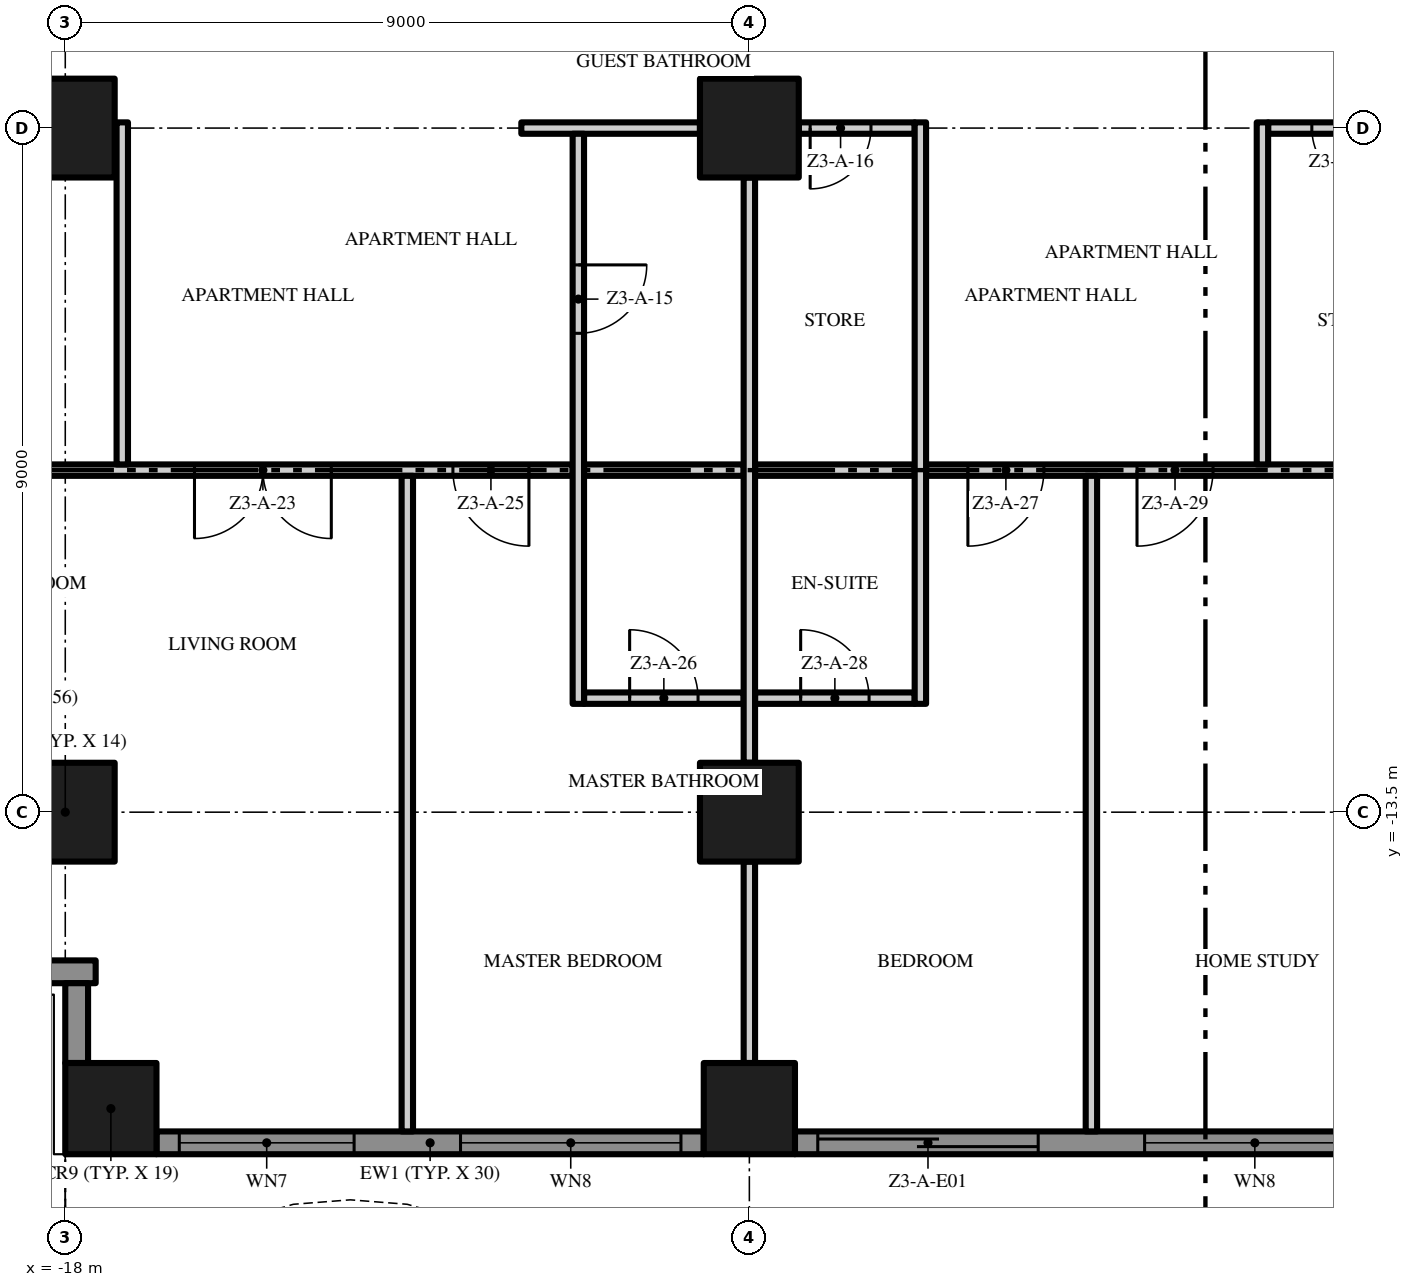
"""IFC4 building model, lengths in metres.
Left out: names, types, materials, properties, quantities, classifications, styles, units other than length and angle.
Written with IfcOpenShell. Run it as: python <this file> out.ifc"""

import sys

from ifc_helpers import new_model, si_unit, direction, frame, frame_2d, origin, origin_2d, place, context, subcontext, project, spatial, polyline, rectangle, outline, extrude, element, fill, save


model = new_model("IFC4")
c1 = context("Model", 3, precision=1e-05, world=origin(), true_north=direction((0.0, 1.0)))
c2 = subcontext(c1, "Body", "Model", "MODEL_VIEW")
j1 = project(units=[si_unit("LENGTHUNIT", "METRE"), si_unit("PLANEANGLEUNIT", "RADIAN")], contexts=[c1])
p1 = place(None, origin())
s1 = spatial("IfcSite", under=j1, at=p1, CompositionType="ELEMENT")
p2 = place(p1, origin())
s2 = spatial("IfcBuilding", under=s1, at=p2, CompositionType="ELEMENT")
p3 = place(p2, frame((0.0, 0.0, 128.8)))
s3 = spatial("IfcBuildingStorey", under=s2, at=p3, CompositionType="ELEMENT", Elevation=128.8)
p4 = place(p3, frame((-18.0, -13.5, 0.0), z_axis=(0.0, 0.0, 1.0), x_axis=(1.0, 0.0, 0.0)))
e1 = element("IfcColumn", 1, at=p4, inside=s3, PredefinedType="COLUMN", context=c2, shape_type="SweptSolid", body=[
    extrude(rectangle(XDim=1.3, YDim=1.3, at=origin_2d()), origin(), (0.0, 0.0, 1.0), 3.5),
])
p5 = place(p3, frame((-17.4, -17.4, 0.0), z_axis=(0.0, 0.0, 1.0), x_axis=(1.0, 0.0, 0.0)))
e2 = element("IfcColumn", 2, at=p5, inside=s3, PredefinedType="COLUMN", context=c2, shape_type="SweptSolid", body=[
    extrude(rectangle(XDim=1.2, YDim=1.2, at=origin_2d()), origin(), (0.0, 0.0, 1.0), 3.5),
])
for number, where, z_axis, x_axis in (
    (3, (-18.0, -4.5, 0.0), (0.0, 0.0, 1.0), (1.0, 0.0, 0.0)),
    (4, (-9.0, -13.5, 0.0), (0.0, 0.0, 1.0), (1.0, 0.0, 0.0)),
):
    element("IfcColumn", number, at=place(p3, frame(where, z_axis=z_axis, x_axis=x_axis)), inside=s3, PredefinedType="COLUMN", context=c2, shape_type="SweptSolid", body=[
        extrude(rectangle(XDim=1.3, YDim=1.3, at=origin_2d()), origin(), (0.0, 0.0, 1.0), 3.5),
    ])
p6 = place(p3, frame((-9.0, -17.4, 0.0), z_axis=(0.0, 0.0, 1.0), x_axis=(1.0, 0.0, 0.0)))
e5 = element("IfcColumn", 5, at=p6, inside=s3, PredefinedType="COLUMN", context=c2, shape_type="SweptSolid", body=[
    extrude(rectangle(XDim=1.2, YDim=1.2, at=origin_2d()), origin(), (0.0, 0.0, 1.0), 3.5),
])
p7 = place(p3, frame((-9.0, -4.5, 0.0), z_axis=(0.0, 0.0, 1.0), x_axis=(1.0, 0.0, 0.0)))
e6 = element("IfcColumn", 6, at=p7, inside=s3, PredefinedType="COLUMN", context=c2, shape_type="SweptSolid", body=[
    extrude(rectangle(XDim=1.3, YDim=1.3, at=origin_2d()), origin(), (0.0, 0.0, 1.0), 3.5),
])
p8 = place(p3, frame((-9.6, -17.85, 0.0), z_axis=(0.0, 0.0, 1.0), x_axis=(-1.0, 0.0, 0.0)))
e7 = element("IfcWall", 7, at=p8, inside=s3, PredefinedType="SOLIDWALL", context=c2, shape_type="SweptSolid", body=[
    extrude(rectangle(XDim=7.2, YDim=0.3, at=frame_2d((3.6, 0.0))), origin(), (0.0, 0.0, 1.0), 3.5),
])
p9 = place(p8, frame((4.6, 0.0, 0.45)))
e8 = element("IfcOpeningElement", 8, at=p9, cuts=e7, PredefinedType="OPENING", context=c2, shape_type="SweptSolid", body=[
    extrude(rectangle(XDim=2.3, YDim=2.65, at=frame_2d((1.15, 1.325))), frame((0.0, 0.16, 0.0), z_axis=(0.0, -1.0, 0.0), x_axis=(1.0, 0.0, 0.0)), (0.0, 0.0, 1.0), 0.32),
])
p10 = place(p8, frame((0.3, 0.0, 0.45)))
e9 = element("IfcOpeningElement", 9, at=p10, cuts=e7, PredefinedType="OPENING", context=c2, shape_type="SweptSolid", body=[
    extrude(rectangle(XDim=2.9, YDim=2.65, at=frame_2d((1.45, 1.325))), frame((0.0, 0.16, 0.0), z_axis=(0.0, -1.0, 0.0), x_axis=(1.0, 0.0, 0.0)), (0.0, 0.0, 1.0), 0.32),
])
p11 = place(p3, frame((-0.6, -17.85, 0.0), z_axis=(0.0, 0.0, 1.0), x_axis=(-1.0, 0.0, 0.0)))
e10 = element("IfcWall", 10, at=p11, inside=s3, PredefinedType="SOLIDWALL", context=c2, shape_type="SweptSolid", body=[
    extrude(rectangle(XDim=7.8, YDim=0.3, at=frame_2d((3.9, 0.0))), origin(), (0.0, 0.0, 1.0), 3.5),
])
p12 = place(p11, frame((4.6, 0.0, 0.0)))
e11 = element("IfcOpeningElement", 11, at=p12, cuts=e10, PredefinedType="OPENING", context=c2, shape_type="SweptSolid", body=[
    extrude(rectangle(XDim=2.9, YDim=2.4, at=frame_2d((1.45, 1.2))), frame((0.0, 0.16, 0.0), z_axis=(0.0, -1.0, 0.0), x_axis=(1.0, 0.0, 0.0)), (0.0, 0.0, 1.0), 0.32),
])
p13 = place(p11, frame((0.3, 0.0, 0.45)))
e12 = element("IfcOpeningElement", 12, at=p13, cuts=e10, PredefinedType="OPENING", context=c2, shape_type="SweptSolid", body=[
    extrude(rectangle(XDim=2.9, YDim=2.65, at=frame_2d((1.45, 1.325))), frame((0.0, 0.16, 0.0), z_axis=(0.0, -1.0, 0.0), x_axis=(1.0, 0.0, 0.0)), (0.0, 0.0, 1.0), 0.32),
])
p14 = place(p3, frame((-17.6, -15.6, 0.0), z_axis=(0.0, 0.0, 1.0), x_axis=(-1.0, 0.0, 0.0)))
e13 = element("IfcWall", 13, at=p14, inside=s3, PredefinedType="SOLIDWALL", context=c2, shape_type="SweptSolid", body=[
    extrude(rectangle(XDim=2.35, YDim=0.3, at=frame_2d((1.175, 0.0))), origin(), (0.0, 0.0, 1.0), 3.5),
])
p15 = place(p3, frame((-17.85, -16.8, 0.0), z_axis=(0.0, 0.0, 1.0), x_axis=(0.0, 1.0, 0.0)))
e14 = element("IfcWall", 14, at=p15, inside=s3, PredefinedType="SOLIDWALL", context=c2, shape_type="SweptSolid", body=[
    extrude(rectangle(XDim=1.05, YDim=0.3, at=frame_2d((0.525, 0.0))), origin(), (0.0, 0.0, 1.0), 3.5),
])
p16 = place(p3, origin())
e15 = element("IfcWall", 15, at=p16, inside=s3, PredefinedType="USERDEFINED", context=c2, shape_type="SweptSolid", body=[
    extrude(outline(polyline([(-18.0, -19.8), (-16.5, -19.095), (-15.0, -18.659), (-14.25, -18.6), (-13.5, -18.659), (-12.0, -19.095), (-10.5, -19.8), (-9.0, -20.505), (-7.5, -20.941), (-6.75, -21.0), (-6.0, -20.941), (-4.5, -20.505), (-3.0, -19.8), (-1.5, -19.095), (0.0, -18.659), (0.75, -18.6), (1.5, -18.659), (3.0, -19.095), (4.5, -19.8), (6.0, -20.505), (7.5, -20.941), (8.25, -21.0), (9.0, -20.941), (10.5, -20.505), (12.0, -19.8), (13.5, -19.095), (15.0, -18.659), (15.75, -18.6), (16.5, -18.659), (18.0, -19.095), (18.07, -18.855), (16.545, -18.411), (15.75, -18.349), (14.955, -18.411), (13.411, -18.86), (11.894, -19.574), (10.411, -20.271), (8.955, -20.694), (8.25, -20.749), (7.545, -20.694), (6.089, -20.271), (4.606, -19.574), (3.089, -18.86), (1.545, -18.411), (0.75, -18.349), (-0.045, -18.411), (-1.589, -18.86), (-3.106, -19.574), (-4.589, -20.271), (-6.045, -20.694), (-6.75, -20.749), (-7.455, -20.694), (-8.911, -20.271), (-10.394, -19.574), (-11.911, -18.86), (-13.455, -18.411), (-14.25, -18.349), (-15.045, -18.411), (-16.589, -18.86), (-18.106, -19.574), (-18.0, -19.8)])), origin(), (0.0, 0.0, 1.0), 0.9),
])
p17 = place(p3, frame((-11.175, -12.0, 0.0), z_axis=(0.0, 0.0, 1.0), x_axis=(1.0, 0.0, 0.0)))
e16 = element("IfcWall", 16, at=p17, inside=s3, PredefinedType="PARTITIONING", context=c2, shape_type="SweptSolid", body=[
    extrude(rectangle(XDim=2.1, YDim=0.15, at=frame_2d((1.05, 0.0))), origin(), (0.0, 0.0, 1.0), 3.5),
])
p18 = place(p17, frame((0.6, 0.0, 0.0)))
e17 = element("IfcOpeningElement", 17, at=p18, cuts=e16, PredefinedType="OPENING", context=c2, shape_type="SweptSolid", body=[
    extrude(rectangle(XDim=0.9, YDim=2.1, at=frame_2d((0.45, 1.05))), frame((0.0, 0.085, 0.0), z_axis=(0.0, -1.0, 0.0), x_axis=(1.0, 0.0, 0.0)), (0.0, 0.0, 1.0), 0.17),
])
p19 = place(p3, frame((-8.925, -12.0, 0.0), z_axis=(0.0, 0.0, 1.0), x_axis=(1.0, 0.0, 0.0)))
e18 = element("IfcWall", 18, at=p19, inside=s3, PredefinedType="PARTITIONING", context=c2, shape_type="SweptSolid", body=[
    extrude(rectangle(XDim=2.1, YDim=0.15, at=frame_2d((1.05, 0.0))), origin(), (0.0, 0.0, 1.0), 3.5),
])
p20 = place(p19, frame((0.6, 0.0, 0.0)))
e19 = element("IfcOpeningElement", 19, at=p20, cuts=e18, PredefinedType="OPENING", context=c2, shape_type="SweptSolid", body=[
    extrude(rectangle(XDim=0.9, YDim=2.1, at=frame_2d((0.45, 1.05))), frame((0.0, 0.085, 0.0), z_axis=(0.0, -1.0, 0.0), x_axis=(1.0, 0.0, 0.0)), (0.0, 0.0, 1.0), 0.17),
])
p21 = place(p3, frame((-11.325, -9.0, 0.0), z_axis=(0.0, 0.0, 1.0), x_axis=(-1.0, 0.0, 0.0)))
e20 = element("IfcWall", 20, at=p21, inside=s3, PredefinedType="PARTITIONING", context=c2, shape_type="SweptSolid", body=[
    extrude(rectangle(XDim=10.875, YDim=0.15, at=frame_2d((5.438, 0.0))), origin(), (0.0, 0.0, 1.0), 3.5),
])
p22 = place(p21, frame((3.175, 0.0, 0.0)))
e21 = element("IfcOpeningElement", 21, at=p22, cuts=e20, PredefinedType="OPENING", context=c2, shape_type="SweptSolid", body=[
    extrude(rectangle(XDim=1.8, YDim=2.4, at=frame_2d((0.9, 1.2))), frame((0.0, 0.085, 0.0), z_axis=(0.0, -1.0, 0.0), x_axis=(1.0, 0.0, 0.0)), (0.0, 0.0, 1.0), 0.17),
])
p23 = place(p21, frame((0.575, 0.0, 0.0)))
e22 = element("IfcOpeningElement", 22, at=p23, cuts=e20, PredefinedType="OPENING", context=c2, shape_type="SweptSolid", body=[
    extrude(rectangle(XDim=1.0, YDim=2.4, at=frame_2d((0.5, 1.2))), frame((0.0, 0.085, 0.0), z_axis=(0.0, -1.0, 0.0), x_axis=(1.0, 0.0, 0.0)), (0.0, 0.0, 1.0), 0.17),
])
for number, where, z_axis, x_axis in (
    (23, (-11.175, -9.0, 0.0), (0.0, 0.0, 1.0), (1.0, 0.0, 0.0)),
    (24, (-8.925, -9.0, 0.0), (0.0, 0.0, 1.0), (1.0, 0.0, 0.0)),
):
    element("IfcWall", number, at=place(p3, frame(where, z_axis=z_axis, x_axis=x_axis)), inside=s3, PredefinedType="PARTITIONING", context=c2, shape_type="SweptSolid", body=[
        extrude(rectangle(XDim=2.1, YDim=0.15, at=frame_2d((1.05, 0.0))), origin(), (0.0, 0.0, 1.0), 3.5),
    ])
p24 = place(p3, frame((-0.075, -9.0, 0.0), z_axis=(0.0, 0.0, 1.0), x_axis=(-1.0, 0.0, 0.0)))
e25 = element("IfcWall", 25, at=p24, inside=s3, PredefinedType="PARTITIONING", context=c2, shape_type="SweptSolid", body=[
    extrude(rectangle(XDim=6.6, YDim=0.15, at=frame_2d((3.3, 0.0))), origin(), (0.0, 0.0, 1.0), 3.5),
])
p25 = place(p24, frame((5.05, 0.0, 0.0)))
e26 = element("IfcOpeningElement", 26, at=p25, cuts=e25, PredefinedType="OPENING", context=c2, shape_type="SweptSolid", body=[
    extrude(rectangle(XDim=1.0, YDim=2.4, at=frame_2d((0.5, 1.2))), frame((0.0, 0.085, 0.0), z_axis=(0.0, -1.0, 0.0), x_axis=(1.0, 0.0, 0.0)), (0.0, 0.0, 1.0), 0.17),
])
p26 = place(p24, frame((2.825, 0.0, 0.0)))
e27 = element("IfcOpeningElement", 27, at=p26, cuts=e25, PredefinedType="OPENING", context=c2, shape_type="SweptSolid", body=[
    extrude(rectangle(XDim=1.0, YDim=2.4, at=frame_2d((0.5, 1.2))), frame((0.0, 0.085, 0.0), z_axis=(0.0, -1.0, 0.0), x_axis=(1.0, 0.0, 0.0)), (0.0, 0.0, 1.0), 0.17),
])
p27 = place(p3, frame((-12.0, -4.5, 0.0), z_axis=(0.0, 0.0, 1.0), x_axis=(1.0, 0.0, 0.0)))
e28 = element("IfcWall", 28, at=p27, inside=s3, PredefinedType="PARTITIONING", context=c2, shape_type="SweptSolid", body=[
    extrude(rectangle(XDim=2.35, YDim=0.15, at=frame_2d((1.175, 0.0))), origin(), (0.0, 0.0, 1.0), 3.5),
])
p28 = place(p3, frame((-6.825, -4.5, 0.0), z_axis=(0.0, 0.0, 1.0), x_axis=(-1.0, 0.0, 0.0)))
e29 = element("IfcWall", 29, at=p28, inside=s3, PredefinedType="PARTITIONING", context=c2, shape_type="SweptSolid", body=[
    extrude(rectangle(XDim=1.525, YDim=0.15, at=frame_2d((0.762, 0.0))), origin(), (0.0, 0.0, 1.0), 3.5),
])
p29 = place(p28, frame((0.575, 0.0, 0.0)))
e30 = element("IfcOpeningElement", 30, at=p29, cuts=e29, PredefinedType="OPENING", context=c2, shape_type="SweptSolid", body=[
    extrude(rectangle(XDim=0.8, YDim=2.0, at=frame_2d((0.4, 1.0))), frame((0.0, 0.085, 0.0), z_axis=(0.0, -1.0, 0.0), x_axis=(1.0, 0.0, 0.0)), (0.0, 0.0, 1.0), 0.17),
])
p30 = place(p3, frame((-0.65, -4.5, 0.0), z_axis=(0.0, 0.0, 1.0), x_axis=(-1.0, 0.0, 0.0)))
e31 = element("IfcWall", 31, at=p30, inside=s3, PredefinedType="PARTITIONING", context=c2, shape_type="SweptSolid", body=[
    extrude(rectangle(XDim=1.525, YDim=0.15, at=frame_2d((0.762, 0.0))), origin(), (0.0, 0.0, 1.0), 3.5),
])
p31 = place(p30, frame((0.15, 0.0, 0.0)))
e32 = element("IfcOpeningElement", 32, at=p31, cuts=e31, PredefinedType="OPENING", context=c2, shape_type="SweptSolid", body=[
    extrude(rectangle(XDim=0.8, YDim=2.0, at=frame_2d((0.4, 1.0))), frame((0.0, 0.085, 0.0), z_axis=(0.0, -1.0, 0.0), x_axis=(1.0, 0.0, 0.0)), (0.0, 0.0, 1.0), 0.17),
])
p32 = place(p3, frame((-17.25, -8.925, 0.0), z_axis=(0.0, 0.0, 1.0), x_axis=(0.0, 1.0, 0.0)))
e33 = element("IfcWall", 33, at=p32, inside=s3, PredefinedType="PARTITIONING", context=c2, shape_type="SweptSolid", body=[
    extrude(rectangle(XDim=4.5, YDim=0.15, at=frame_2d((2.25, 0.0))), origin(), (0.0, 0.0, 1.0), 3.5),
])
p33 = place(p3, frame((-13.5, -17.7, 0.0), z_axis=(0.0, 0.0, 1.0), x_axis=(0.0, 1.0, 0.0)))
e34 = element("IfcWall", 34, at=p33, inside=s3, PredefinedType="PARTITIONING", context=c2, shape_type="SweptSolid", body=[
    extrude(rectangle(XDim=8.625, YDim=0.15, at=frame_2d((4.312, 0.0))), origin(), (0.0, 0.0, 1.0), 3.5),
])
p34 = place(p3, frame((-11.25, -4.575, 0.0), z_axis=(0.0, 0.0, 1.0), x_axis=(0.0, -1.0, 0.0)))
e35 = element("IfcWall", 35, at=p34, inside=s3, PredefinedType="PARTITIONING", context=c2, shape_type="SweptSolid", body=[
    extrude(rectangle(XDim=7.5, YDim=0.15, at=frame_2d((3.75, 0.0))), origin(), (0.0, 0.0, 1.0), 3.5),
])
p35 = place(p34, frame((1.725, 0.0, 0.0)))
e36 = element("IfcOpeningElement", 36, at=p35, cuts=e35, PredefinedType="OPENING", context=c2, shape_type="SweptSolid", body=[
    extrude(rectangle(XDim=0.9, YDim=2.1, at=frame_2d((0.45, 1.05))), frame((0.0, 0.085, 0.0), z_axis=(0.0, -1.0, 0.0), x_axis=(1.0, 0.0, 0.0)), (0.0, 0.0, 1.0), 0.17),
])
p36 = place(p3, frame((-9.0, -16.8, 0.0), z_axis=(0.0, 0.0, 1.0), x_axis=(0.0, 1.0, 0.0)))
e37 = element("IfcWall", 37, at=p36, inside=s3, PredefinedType="PARTITIONING", context=c2, shape_type="SweptSolid", body=[
    extrude(rectangle(XDim=2.65, YDim=0.15, at=frame_2d((1.325, 0.0))), origin(), (0.0, 0.0, 1.0), 3.5),
])
p37 = place(p3, frame((-9.0, -12.85, 0.0), z_axis=(0.0, 0.0, 1.0), x_axis=(0.0, 1.0, 0.0)))
e38 = element("IfcWall", 38, at=p37, inside=s3, PredefinedType="PARTITIONING", context=c2, shape_type="SweptSolid", body=[
    extrude(rectangle(XDim=7.7, YDim=0.15, at=frame_2d((3.85, 0.0))), origin(), (0.0, 0.0, 1.0), 3.5),
])
p38 = place(p3, frame((-6.75, -12.075, 0.0), z_axis=(0.0, 0.0, 1.0), x_axis=(0.0, 1.0, 0.0)))
e39 = element("IfcWall", 39, at=p38, inside=s3, PredefinedType="PARTITIONING", context=c2, shape_type="SweptSolid", body=[
    extrude(rectangle(XDim=7.65, YDim=0.15, at=frame_2d((3.825, 0.0))), origin(), (0.0, 0.0, 1.0), 3.5),
])
p39 = place(p3, frame((-4.5, -17.7, 0.0), z_axis=(0.0, 0.0, 1.0), x_axis=(0.0, 1.0, 0.0)))
e40 = element("IfcWall", 40, at=p39, inside=s3, PredefinedType="PARTITIONING", context=c2, shape_type="SweptSolid", body=[
    extrude(rectangle(XDim=8.625, YDim=0.15, at=frame_2d((4.312, 0.0))), origin(), (0.0, 0.0, 1.0), 3.5),
])
p40 = place(p3, frame((-2.25, -8.925, 0.0), z_axis=(0.0, 0.0, 1.0), x_axis=(0.0, 1.0, 0.0)))
e41 = element("IfcWall", 41, at=p40, inside=s3, PredefinedType="PARTITIONING", context=c2, shape_type="SweptSolid", body=[
    extrude(rectangle(XDim=4.5, YDim=0.15, at=frame_2d((2.25, 0.0))), origin(), (0.0, 0.0, 1.0), 3.5),
])
p41 = place(p9, origin())
e42 = element("IfcWindow", 42, at=p41, inside=s3, PartitioningType="SINGLE_PANEL", PredefinedType="WINDOW", context=c2, shape_type="SweptSolid", body=[
    extrude(rectangle(XDim=2.3, YDim=2.65, at=frame_2d((1.15, 1.325))), frame((0.0, 0.03, 0.0), z_axis=(0.0, -1.0, 0.0), x_axis=(1.0, 0.0, 0.0)), (0.0, 0.0, 1.0), 0.06),
])
fill(e8, e42)
p42 = place(p10, origin())
e43 = element("IfcWindow", 43, at=p42, inside=s3, PartitioningType="SINGLE_PANEL", PredefinedType="WINDOW", context=c2, shape_type="SweptSolid", body=[
    extrude(rectangle(XDim=2.9, YDim=2.65, at=frame_2d((1.45, 1.325))), frame((0.0, 0.03, 0.0), z_axis=(0.0, -1.0, 0.0), x_axis=(1.0, 0.0, 0.0)), (0.0, 0.0, 1.0), 0.06),
])
fill(e9, e43)
p43 = place(p12, origin())
e44 = element("IfcDoor", 44, at=p43, inside=s3, OperationType="SINGLE_SWING_LEFT", PredefinedType="DOOR", context=c2, shape_type="SweptSolid", body=[
    extrude(rectangle(XDim=2.9, YDim=2.4, at=frame_2d((1.45, 1.2))), frame((0.0, 0.025, 0.0), z_axis=(0.0, -1.0, 0.0), x_axis=(1.0, 0.0, 0.0)), (0.0, 0.0, 1.0), 0.05),
])
fill(e11, e44)
p44 = place(p13, origin())
e45 = element("IfcWindow", 45, at=p44, inside=s3, PartitioningType="SINGLE_PANEL", PredefinedType="WINDOW", context=c2, shape_type="SweptSolid", body=[
    extrude(rectangle(XDim=2.9, YDim=2.65, at=frame_2d((1.45, 1.325))), frame((0.0, 0.03, 0.0), z_axis=(0.0, -1.0, 0.0), x_axis=(1.0, 0.0, 0.0)), (0.0, 0.0, 1.0), 0.06),
])
fill(e12, e45)
p45 = place(p35, origin())
e46 = element("IfcDoor", 46, at=p45, inside=s3, OperationType="SINGLE_SWING_LEFT", PredefinedType="DOOR", context=c2, shape_type="SweptSolid", body=[
    extrude(rectangle(XDim=0.9, YDim=2.1, at=frame_2d((0.45, 1.05))), frame((0.0, 0.025, 0.0), z_axis=(0.0, -1.0, 0.0), x_axis=(1.0, 0.0, 0.0)), (0.0, 0.0, 1.0), 0.05),
])
fill(e36, e46)
p46 = place(p29, origin())
e47 = element("IfcDoor", 47, at=p46, inside=s3, OperationType="SINGLE_SWING_RIGHT", PredefinedType="DOOR", context=c2, shape_type="SweptSolid", body=[
    extrude(rectangle(XDim=0.8, YDim=2.0, at=frame_2d((0.4, 1.0))), frame((0.0, 0.025, 0.0), z_axis=(0.0, -1.0, 0.0), x_axis=(1.0, 0.0, 0.0)), (0.0, 0.0, 1.0), 0.05),
])
fill(e30, e47)
p47 = place(p31, origin())
e48 = element("IfcDoor", 48, at=p47, inside=s3, OperationType="SINGLE_SWING_LEFT", PredefinedType="DOOR", context=c2, shape_type="SweptSolid", body=[
    extrude(rectangle(XDim=0.8, YDim=2.0, at=frame_2d((0.4, 1.0))), frame((0.0, 0.025, 0.0), z_axis=(0.0, -1.0, 0.0), x_axis=(1.0, 0.0, 0.0)), (0.0, 0.0, 1.0), 0.05),
])
fill(e32, e48)
p48 = place(p22, origin())
e49 = element("IfcDoor", 49, at=p48, inside=s3, OperationType="DOUBLE_DOOR_SINGLE_SWING", PredefinedType="DOOR", context=c2, shape_type="SweptSolid", body=[
    extrude(rectangle(XDim=1.8, YDim=2.4, at=frame_2d((0.9, 1.2))), frame((0.0, 0.025, 0.0), z_axis=(0.0, -1.0, 0.0), x_axis=(1.0, 0.0, 0.0)), (0.0, 0.0, 1.0), 0.05),
])
fill(e21, e49)
p49 = place(p23, origin())
e50 = element("IfcDoor", 50, at=p49, inside=s3, OperationType="SINGLE_SWING_LEFT", PredefinedType="DOOR", context=c2, shape_type="SweptSolid", body=[
    extrude(rectangle(XDim=1.0, YDim=2.4, at=frame_2d((0.5, 1.2))), frame((0.0, 0.025, 0.0), z_axis=(0.0, -1.0, 0.0), x_axis=(1.0, 0.0, 0.0)), (0.0, 0.0, 1.0), 0.05),
])
fill(e22, e50)
p50 = place(p18, origin())
e51 = element("IfcDoor", 51, at=p50, inside=s3, OperationType="SINGLE_SWING_LEFT", PredefinedType="DOOR", context=c2, shape_type="SweptSolid", body=[
    extrude(rectangle(XDim=0.9, YDim=2.1, at=frame_2d((0.45, 1.05))), frame((0.0, 0.025, 0.0), z_axis=(0.0, -1.0, 0.0), x_axis=(1.0, 0.0, 0.0)), (0.0, 0.0, 1.0), 0.05),
])
fill(e17, e51)
p51 = place(p25, origin())
e52 = element("IfcDoor", 52, at=p51, inside=s3, OperationType="SINGLE_SWING_RIGHT", PredefinedType="DOOR", context=c2, shape_type="SweptSolid", body=[
    extrude(rectangle(XDim=1.0, YDim=2.4, at=frame_2d((0.5, 1.2))), frame((0.0, 0.025, 0.0), z_axis=(0.0, -1.0, 0.0), x_axis=(1.0, 0.0, 0.0)), (0.0, 0.0, 1.0), 0.05),
])
fill(e26, e52)
p52 = place(p20, origin())
e53 = element("IfcDoor", 53, at=p52, inside=s3, OperationType="SINGLE_SWING_LEFT", PredefinedType="DOOR", context=c2, shape_type="SweptSolid", body=[
    extrude(rectangle(XDim=0.9, YDim=2.1, at=frame_2d((0.45, 1.05))), frame((0.0, 0.025, 0.0), z_axis=(0.0, -1.0, 0.0), x_axis=(1.0, 0.0, 0.0)), (0.0, 0.0, 1.0), 0.05),
])
fill(e19, e53)
p53 = place(p26, origin())
e54 = element("IfcDoor", 54, at=p53, inside=s3, OperationType="SINGLE_SWING_RIGHT", PredefinedType="DOOR", context=c2, shape_type="SweptSolid", body=[
    extrude(rectangle(XDim=1.0, YDim=2.4, at=frame_2d((0.5, 1.2))), frame((0.0, 0.025, 0.0), z_axis=(0.0, -1.0, 0.0), x_axis=(1.0, 0.0, 0.0)), (0.0, 0.0, 1.0), 0.05),
])
fill(e27, e54)
save(model, sys.argv[1])
